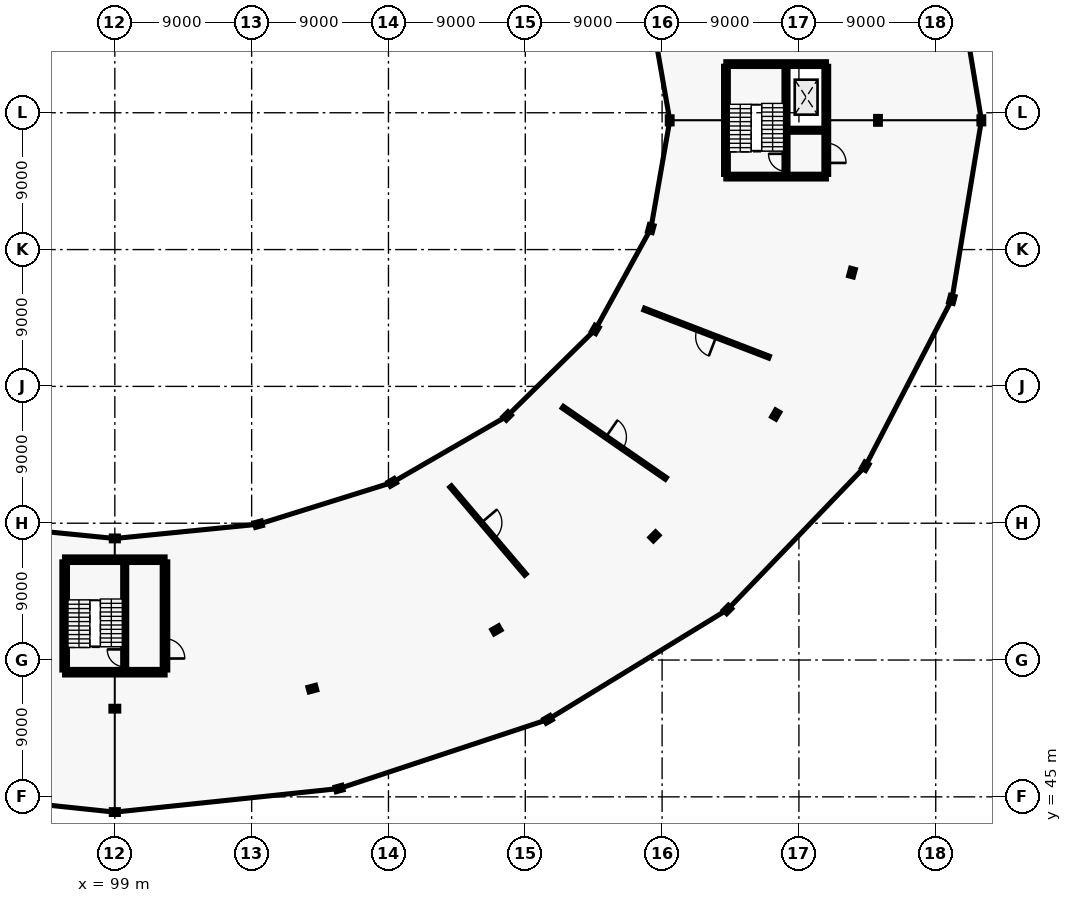
"""IFC4 building model, lengths in metres.
Left out: names, types, materials, properties, quantities, classifications, styles, units other than length and angle.
Written with IfcOpenShell. Run it as: python <this file> out.ifc"""

import sys

from ifc_helpers import new_model, si_unit, direction, frame, frame_2d, origin, origin_2d, place, context, subcontext, project, spatial, rectangle, i_section, extrude, element, fill, save


model = new_model("IFC4")
c1 = context("Model", 3, precision=1e-05, world=origin(), true_north=direction((0.0, 1.0)))
c2 = subcontext(c1, "Body", "Model", "MODEL_VIEW")
j1 = project(units=[si_unit("LENGTHUNIT", "METRE"), si_unit("PLANEANGLEUNIT", "RADIAN")], contexts=[c1])
p1 = place(None, origin())
s1 = spatial("IfcSite", under=j1, at=p1, CompositionType="ELEMENT")
p2 = place(p1, origin())
s2 = spatial("IfcBuilding", under=s1, at=p2, CompositionType="ELEMENT")
p3 = place(p2, frame((0.0, 0.0, 5.4)))
s3 = spatial("IfcBuildingStorey", under=s2, at=p3, CompositionType="ELEMENT", Elevation=5.4)
p4 = place(p3, frame((135.5, 89.5, 0.0), z_axis=(0.0, 0.0, 1.0), x_axis=(1.0, 0.0, 0.0)))
e1 = element("IfcColumn", 1, at=p4, inside=s3, PredefinedType="COLUMN", context=c2, shape_type="SweptSolid", body=[
    extrude(i_section(OverallWidth=0.3, OverallDepth=0.45, WebThickness=0.014, FlangeThickness=0.026, FilletRadius=0.027, at=origin_2d()), origin(), (0.0, 0.0, 1.0), 4.2),
])
p5 = place(p3, frame((149.2, 89.5, 0.0), z_axis=(0.0, 0.0, 1.0), x_axis=(1.0, 0.0, 0.0)))
e2 = element("IfcColumn", 2, at=p5, inside=s3, PredefinedType="COLUMN", context=c2, shape_type="SweptSolid", body=[
    extrude(i_section(OverallWidth=0.3, OverallDepth=0.5, WebThickness=0.014, FlangeThickness=0.028, FilletRadius=0.027, at=origin_2d()), origin(), (0.0, 0.0, 1.0), 4.2),
])
p6 = place(p3, frame((156.0, 89.5, 0.0), z_axis=(0.0, 0.0, 1.0), x_axis=(1.0, 0.0, 0.0)))
e3 = element("IfcColumn", 3, at=p6, inside=s3, PredefinedType="COLUMN", context=c2, shape_type="SweptSolid", body=[
    extrude(i_section(OverallWidth=0.3, OverallDepth=0.45, WebThickness=0.014, FlangeThickness=0.026, FilletRadius=0.027, at=origin_2d()), origin(), (0.0, 0.0, 1.0), 4.18),
])
p7 = place(p3, frame((99.0, 62.0, 0.0), z_axis=(0.0, 0.0, 1.0), x_axis=(0.0, -1.0, 0.0)))
e4 = element("IfcColumn", 4, at=p7, inside=s3, PredefinedType="COLUMN", context=c2, shape_type="SweptSolid", body=[
    extrude(i_section(OverallWidth=0.3, OverallDepth=0.45, WebThickness=0.014, FlangeThickness=0.026, FilletRadius=0.027, at=origin_2d()), origin(), (0.0, 0.0, 1.0), 4.2),
])
p8 = place(p3, frame((99.0, 50.8, 0.0), z_axis=(0.0, 0.0, 1.0), x_axis=(0.0, -1.0, 0.0)))
e5 = element("IfcColumn", 5, at=p8, inside=s3, PredefinedType="COLUMN", context=c2, shape_type="SweptSolid", body=[
    extrude(i_section(OverallWidth=0.3, OverallDepth=0.5, WebThickness=0.014, FlangeThickness=0.028, FilletRadius=0.027, at=origin_2d()), origin(), (0.0, 0.0, 1.0), 4.2),
])
p9 = place(p3, frame((99.0, 44.0, 0.0), z_axis=(0.0, 0.0, 1.0), x_axis=(0.0, -1.0, 0.0)))
e6 = element("IfcColumn", 6, at=p9, inside=s3, PredefinedType="COLUMN", context=c2, shape_type="SweptSolid", body=[
    extrude(i_section(OverallWidth=0.3, OverallDepth=0.45, WebThickness=0.014, FlangeThickness=0.026, FilletRadius=0.027, at=origin_2d()), origin(), (0.0, 0.0, 1.0), 4.18),
])
p10 = place(p3, frame((108.447, 62.937, 0.0), z_axis=(0.0, 0.0, 1.0), x_axis=(0.258819045103, -0.965925826289, 0.0)))
e7 = element("IfcColumn", 7, at=p10, inside=s3, PredefinedType="COLUMN", context=c2, shape_type="SweptSolid", body=[
    extrude(i_section(OverallWidth=0.3, OverallDepth=0.45, WebThickness=0.014, FlangeThickness=0.026, FilletRadius=0.027, at=origin_2d()), origin(), (0.0, 0.0, 1.0), 4.2),
])
p11 = place(p3, frame((111.993, 52.119, 0.0), z_axis=(0.0, 0.0, 1.0), x_axis=(0.258819045103, -0.965925826289, 0.0)))
e8 = element("IfcColumn", 8, at=p11, inside=s3, PredefinedType="COLUMN", context=c2, shape_type="SweptSolid", body=[
    extrude(i_section(OverallWidth=0.3, OverallDepth=0.5, WebThickness=0.014, FlangeThickness=0.028, FilletRadius=0.027, at=origin_2d()), origin(), (0.0, 0.0, 1.0), 4.2),
])
p12 = place(p3, frame((113.753, 45.55, 0.0), z_axis=(0.0, 0.0, 1.0), x_axis=(0.258819045103, -0.965925826289, 0.0)))
e9 = element("IfcColumn", 9, at=p12, inside=s3, PredefinedType="COLUMN", context=c2, shape_type="SweptSolid", body=[
    extrude(i_section(OverallWidth=0.3, OverallDepth=0.45, WebThickness=0.014, FlangeThickness=0.026, FilletRadius=0.027, at=origin_2d()), origin(), (0.0, 0.0, 1.0), 4.18),
])
p13 = place(p3, frame((117.25, 65.684, 0.0), z_axis=(0.0, 0.0, 1.0), x_axis=(0.5, -0.866025403784, 0.0)))
e10 = element("IfcColumn", 10, at=p13, inside=s3, PredefinedType="COLUMN", context=c2, shape_type="SweptSolid", body=[
    extrude(i_section(OverallWidth=0.3, OverallDepth=0.45, WebThickness=0.014, FlangeThickness=0.026, FilletRadius=0.027, at=origin_2d()), origin(), (0.0, 0.0, 1.0), 4.2),
])
p14 = place(p3, frame((124.1, 55.985, 0.0), z_axis=(0.0, 0.0, 1.0), x_axis=(0.5, -0.866025403784, 0.0)))
e11 = element("IfcColumn", 11, at=p14, inside=s3, PredefinedType="COLUMN", context=c2, shape_type="SweptSolid", body=[
    extrude(i_section(OverallWidth=0.3, OverallDepth=0.5, WebThickness=0.014, FlangeThickness=0.028, FilletRadius=0.027, at=origin_2d()), origin(), (0.0, 0.0, 1.0), 4.2),
])
p15 = place(p3, frame((127.5, 50.096, 0.0), z_axis=(0.0, 0.0, 1.0), x_axis=(0.5, -0.866025403784, 0.0)))
e12 = element("IfcColumn", 12, at=p15, inside=s3, PredefinedType="COLUMN", context=c2, shape_type="SweptSolid", body=[
    extrude(i_section(OverallWidth=0.3, OverallDepth=0.45, WebThickness=0.014, FlangeThickness=0.026, FilletRadius=0.027, at=origin_2d()), origin(), (0.0, 0.0, 1.0), 4.18),
])
p16 = place(p3, frame((124.809, 70.055, 0.0), z_axis=(0.0, 0.0, 1.0), x_axis=(0.707106781187, -0.707106781187, 0.0)))
e13 = element("IfcColumn", 13, at=p16, inside=s3, PredefinedType="COLUMN", context=c2, shape_type="SweptSolid", body=[
    extrude(i_section(OverallWidth=0.3, OverallDepth=0.45, WebThickness=0.014, FlangeThickness=0.026, FilletRadius=0.027, at=origin_2d()), origin(), (0.0, 0.0, 1.0), 4.2),
])
p17 = place(p3, frame((134.497, 62.135, 0.0), z_axis=(0.0, 0.0, 1.0), x_axis=(0.707106781187, -0.707106781187, 0.0)))
e14 = element("IfcColumn", 14, at=p17, inside=s3, PredefinedType="COLUMN", context=c2, shape_type="SweptSolid", body=[
    extrude(i_section(OverallWidth=0.3, OverallDepth=0.5, WebThickness=0.014, FlangeThickness=0.028, FilletRadius=0.027, at=origin_2d()), origin(), (0.0, 0.0, 1.0), 4.2),
])
p18 = place(p3, frame((139.305, 57.327, 0.0), z_axis=(0.0, 0.0, 1.0), x_axis=(0.707106781187, -0.707106781187, 0.0)))
e15 = element("IfcColumn", 15, at=p18, inside=s3, PredefinedType="COLUMN", context=c2, shape_type="SweptSolid", body=[
    extrude(i_section(OverallWidth=0.3, OverallDepth=0.45, WebThickness=0.014, FlangeThickness=0.026, FilletRadius=0.027, at=origin_2d()), origin(), (0.0, 0.0, 1.0), 4.18),
])
p19 = place(p3, frame((130.61, 75.75, 0.0), z_axis=(0.0, 0.0, 1.0), x_axis=(0.866025403784, -0.5, 0.0)))
e16 = element("IfcColumn", 16, at=p19, inside=s3, PredefinedType="COLUMN", context=c2, shape_type="SweptSolid", body=[
    extrude(i_section(OverallWidth=0.3, OverallDepth=0.45, WebThickness=0.014, FlangeThickness=0.026, FilletRadius=0.027, at=origin_2d()), origin(), (0.0, 0.0, 1.0), 4.2),
])
p20 = place(p3, frame((142.474, 70.15, 0.0), z_axis=(0.0, 0.0, 1.0), x_axis=(0.866025403784, -0.5, 0.0)))
e17 = element("IfcColumn", 17, at=p20, inside=s3, PredefinedType="COLUMN", context=c2, shape_type="SweptSolid", body=[
    extrude(i_section(OverallWidth=0.3, OverallDepth=0.5, WebThickness=0.014, FlangeThickness=0.028, FilletRadius=0.027, at=origin_2d()), origin(), (0.0, 0.0, 1.0), 4.2),
])
p21 = place(p3, frame((148.363, 66.75, 0.0), z_axis=(0.0, 0.0, 1.0), x_axis=(0.866025403784, -0.5, 0.0)))
e18 = element("IfcColumn", 18, at=p21, inside=s3, PredefinedType="COLUMN", context=c2, shape_type="SweptSolid", body=[
    extrude(i_section(OverallWidth=0.3, OverallDepth=0.45, WebThickness=0.014, FlangeThickness=0.026, FilletRadius=0.027, at=origin_2d()), origin(), (0.0, 0.0, 1.0), 4.18),
])
p22 = place(p3, frame((134.256, 82.382, 0.0), z_axis=(0.0, 0.0, 1.0), x_axis=(0.965925826289, -0.258819045103, 0.0)))
e19 = element("IfcColumn", 19, at=p22, inside=s3, PredefinedType="COLUMN", context=c2, shape_type="SweptSolid", body=[
    extrude(i_section(OverallWidth=0.3, OverallDepth=0.45, WebThickness=0.014, FlangeThickness=0.026, FilletRadius=0.027, at=origin_2d()), origin(), (0.0, 0.0, 1.0), 4.2),
])
p23 = place(p3, frame((147.489, 79.484, 0.0), z_axis=(0.0, 0.0, 1.0), x_axis=(0.965925826289, -0.258819045103, 0.0)))
e20 = element("IfcColumn", 20, at=p23, inside=s3, PredefinedType="COLUMN", context=c2, shape_type="SweptSolid", body=[
    extrude(i_section(OverallWidth=0.3, OverallDepth=0.5, WebThickness=0.014, FlangeThickness=0.028, FilletRadius=0.027, at=origin_2d()), origin(), (0.0, 0.0, 1.0), 4.2),
])
p24 = place(p3, frame((154.058, 77.724, 0.0), z_axis=(0.0, 0.0, 1.0), x_axis=(0.965925826289, -0.258819045103, 0.0)))
e21 = element("IfcColumn", 21, at=p24, inside=s3, PredefinedType="COLUMN", context=c2, shape_type="SweptSolid", body=[
    extrude(i_section(OverallWidth=0.3, OverallDepth=0.45, WebThickness=0.014, FlangeThickness=0.026, FilletRadius=0.027, at=origin_2d()), origin(), (0.0, 0.0, 1.0), 4.18),
])
for number, where, z_axis, x_axis in (
    (22, (139.2, 85.8, 0.0), (0.0, 0.0, 1.0), (1.0, 0.0, 0.0)),
    (23, (139.2, 93.2, 0.0), (0.0, 0.0, 1.0), (1.0, 0.0, 0.0)),
):
    element("IfcWall", number, at=place(p3, frame(where, z_axis=z_axis, x_axis=x_axis)), inside=s3, PredefinedType="SHEAR", context=c2, shape_type="SweptSolid", body=[
        extrude(rectangle(XDim=6.6, YDim=0.3, at=frame_2d((3.3, 0.0))), origin(), (0.0, 0.0, 1.0), 4.2),
    ])
p25 = place(p3, frame((139.2, 85.95, 0.0), z_axis=(0.0, 0.0, 1.0), x_axis=(0.0, 1.0, 0.0)))
e24 = element("IfcWall", 24, at=p25, inside=s3, PredefinedType="SHEAR", context=c2, shape_type="SweptSolid", body=[
    extrude(rectangle(XDim=7.1, YDim=0.3, at=frame_2d((3.55, 0.0))), origin(), (0.0, 0.0, 1.0), 4.2),
])
p26 = place(p3, frame((145.8, 85.95, 0.0), z_axis=(0.0, 0.0, 1.0), x_axis=(0.0, 1.0, 0.0)))
e25 = element("IfcWall", 25, at=p26, inside=s3, PredefinedType="SHEAR", context=c2, shape_type="SweptSolid", body=[
    extrude(rectangle(XDim=7.1, YDim=0.3, at=frame_2d((3.55, 0.0))), origin(), (0.0, 0.0, 1.0), 4.2),
])
p27 = place(p26, frame((0.75, 0.0, 0.0)))
e26 = element("IfcOpeningElement", 26, at=p27, cuts=e25, PredefinedType="OPENING", context=c2, shape_type="SweptSolid", body=[
    extrude(rectangle(XDim=1.3, YDim=2.15, at=frame_2d((0.65, 1.075))), frame((0.0, 0.16, 0.0), z_axis=(0.0, -1.0, 0.0), x_axis=(1.0, 0.0, 0.0)), (0.0, 0.0, 1.0), 0.32),
])
p28 = place(p3, frame((143.15, 85.95, 0.0), z_axis=(0.0, 0.0, 1.0), x_axis=(0.0, 1.0, 0.0)))
e27 = element("IfcWall", 27, at=p28, inside=s3, PredefinedType="SHEAR", context=c2, shape_type="SweptSolid", body=[
    extrude(rectangle(XDim=7.1, YDim=0.25, at=frame_2d((3.55, 0.0))), origin(), (0.0, 0.0, 1.0), 4.2),
])
p29 = place(p28, frame((0.2, 0.0, 0.0)))
e28 = element("IfcOpeningElement", 28, at=p29, cuts=e27, PredefinedType="OPENING", context=c2, shape_type="SweptSolid", body=[
    extrude(rectangle(XDim=1.15, YDim=2.15, at=frame_2d((0.575, 1.075))), frame((0.0, 0.135, 0.0), z_axis=(0.0, -1.0, 0.0), x_axis=(1.0, 0.0, 0.0)), (0.0, 0.0, 1.0), 0.27),
])
p30 = place(p3, frame((143.27, 88.85, 0.0), z_axis=(0.0, 0.0, 1.0), x_axis=(1.0, 0.0, 0.0)))
e29 = element("IfcWall", 29, at=p30, inside=s3, PredefinedType="SHEAR", context=c2, shape_type="SweptSolid", body=[
    extrude(rectangle(XDim=2.38, YDim=0.25, at=frame_2d((1.19, 0.0))), origin(), (0.0, 0.0, 1.0), 4.2),
])
p31 = place(p30, frame((0.64, 0.0, 0.0)))
e30 = element("IfcOpeningElement", 30, at=p31, cuts=e29, PredefinedType="OPENING", context=c2, shape_type="SweptSolid", body=[
    extrude(rectangle(XDim=1.1, YDim=2.15, at=frame_2d((0.55, 1.075))), frame((0.0, 0.135, 0.0), z_axis=(0.0, -1.0, 0.0), x_axis=(1.0, 0.0, 0.0)), (0.0, 0.0, 1.0), 0.27),
])
for number, where, z_axis, x_axis in (
    (31, (95.7, 53.2, 0.0), (0.0, 0.0, 1.0), (1.0, 0.0, 0.0)),
    (32, (95.7, 60.6, 0.0), (0.0, 0.0, 1.0), (1.0, 0.0, 0.0)),
):
    element("IfcWall", number, at=place(p3, frame(where, z_axis=z_axis, x_axis=x_axis)), inside=s3, PredefinedType="SHEAR", context=c2, shape_type="SweptSolid", body=[
        extrude(rectangle(XDim=6.6, YDim=0.35, at=frame_2d((3.3, 0.0))), origin(), (0.0, 0.0, 1.0), 4.2),
    ])
p32 = place(p3, frame((95.7, 53.35, 0.0), z_axis=(0.0, 0.0, 1.0), x_axis=(0.0, 1.0, 0.0)))
e33 = element("IfcWall", 33, at=p32, inside=s3, PredefinedType="SHEAR", context=c2, shape_type="SweptSolid", body=[
    extrude(rectangle(XDim=7.1, YDim=0.35, at=frame_2d((3.55, 0.0))), origin(), (0.0, 0.0, 1.0), 4.2),
])
p33 = place(p3, frame((102.3, 53.35, 0.0), z_axis=(0.0, 0.0, 1.0), x_axis=(0.0, 1.0, 0.0)))
e34 = element("IfcWall", 34, at=p33, inside=s3, PredefinedType="SHEAR", context=c2, shape_type="SweptSolid", body=[
    extrude(rectangle(XDim=7.1, YDim=0.35, at=frame_2d((3.55, 0.0))), origin(), (0.0, 0.0, 1.0), 4.2),
])
p34 = place(p33, frame((0.75, 0.0, 0.0)))
e35 = element("IfcOpeningElement", 35, at=p34, cuts=e34, PredefinedType="OPENING", context=c2, shape_type="SweptSolid", body=[
    extrude(rectangle(XDim=1.3, YDim=2.15, at=frame_2d((0.65, 1.075))), frame((0.0, 0.185, 0.0), z_axis=(0.0, -1.0, 0.0), x_axis=(1.0, 0.0, 0.0)), (0.0, 0.0, 1.0), 0.37),
])
p35 = place(p3, frame((99.65, 53.35, 0.0), z_axis=(0.0, 0.0, 1.0), x_axis=(0.0, 1.0, 0.0)))
e36 = element("IfcWall", 36, at=p35, inside=s3, PredefinedType="SHEAR", context=c2, shape_type="SweptSolid", body=[
    extrude(rectangle(XDim=7.1, YDim=0.25, at=frame_2d((3.55, 0.0))), origin(), (0.0, 0.0, 1.0), 4.2),
])
p36 = place(p35, frame((0.2, 0.0, 0.0)))
e37 = element("IfcOpeningElement", 37, at=p36, cuts=e36, PredefinedType="OPENING", context=c2, shape_type="SweptSolid", body=[
    extrude(rectangle(XDim=1.15, YDim=2.15, at=frame_2d((0.575, 1.075))), frame((0.0, 0.135, 0.0), z_axis=(0.0, -1.0, 0.0), x_axis=(1.0, 0.0, 0.0)), (0.0, 0.0, 1.0), 0.27),
])
p37 = place(p3, frame((121.094, 65.407, 0.0), z_axis=(0.0, 0.0, 1.0), x_axis=(0.647387575623, -0.762160958676, 0.0)))
e38 = element("IfcWall", 38, at=p37, inside=s3, PredefinedType="PARTITIONING", context=c2, shape_type="SweptSolid", body=[
    extrude(rectangle(XDim=7.581, YDim=0.12, at=frame_2d((3.791, 0.0))), origin(), (0.0, 0.0, 1.0), 3.2),
])
p38 = place(p37, frame((3.116, 0.0, 0.0)))
e39 = element("IfcOpeningElement", 39, at=p38, cuts=e38, PredefinedType="OPENING", context=c2, shape_type="SweptSolid", body=[
    extrude(rectangle(XDim=1.35, YDim=2.2, at=frame_2d((0.675, 1.1))), frame((0.0, 0.07, 0.0), z_axis=(0.0, -1.0, 0.0), x_axis=(1.0, 0.0, 0.0)), (0.0, 0.0, 1.0), 0.14),
])
p39 = place(p3, frame((128.475, 70.626, 0.0), z_axis=(0.0, 0.0, 1.0), x_axis=(0.822666462931, -0.568524309743, 0.0)))
e40 = element("IfcWall", 40, at=p39, inside=s3, PredefinedType="PARTITIONING", context=c2, shape_type="SweptSolid", body=[
    extrude(rectangle(XDim=8.223, YDim=0.12, at=frame_2d((4.112, 0.0))), origin(), (0.0, 0.0, 1.0), 3.2),
])
p40 = place(p39, frame((3.437, 0.0, 0.0)))
e41 = element("IfcOpeningElement", 41, at=p40, cuts=e40, PredefinedType="OPENING", context=c2, shape_type="SweptSolid", body=[
    extrude(rectangle(XDim=1.35, YDim=2.2, at=frame_2d((0.675, 1.1))), frame((0.0, 0.07, 0.0), z_axis=(0.0, -1.0, 0.0), x_axis=(1.0, 0.0, 0.0)), (0.0, 0.0, 1.0), 0.14),
])
p41 = place(p3, frame((133.83, 77.082, 0.0), z_axis=(0.0, 0.0, 1.0), x_axis=(0.933238808021, -0.359256631399, 0.0)))
e42 = element("IfcWall", 42, at=p41, inside=s3, PredefinedType="PARTITIONING", context=c2, shape_type="SweptSolid", body=[
    extrude(rectangle(XDim=8.782, YDim=0.12, at=frame_2d((4.391, 0.0))), origin(), (0.0, 0.0, 1.0), 3.2),
])
p42 = place(p41, frame((3.716, 0.0, 0.0)))
e43 = element("IfcOpeningElement", 43, at=p42, cuts=e42, PredefinedType="OPENING", context=c2, shape_type="SweptSolid", body=[
    extrude(rectangle(XDim=1.35, YDim=2.2, at=frame_2d((0.675, 1.1))), frame((0.0, 0.07, 0.0), z_axis=(0.0, -1.0, 0.0), x_axis=(1.0, 0.0, 0.0)), (0.0, 0.0, 1.0), 0.14),
])
p43 = place(p27, frame((1.3, 0.0, 0.0), z_axis=(0.0, 0.0, 1.0), x_axis=(-1.0, 0.0, 0.0)))
e44 = element("IfcDoor", 44, at=p43, inside=s3, OperationType="DOUBLE_DOOR_SINGLE_SWING", PredefinedType="DOOR", context=c2, shape_type="SweptSolid", body=[
    extrude(rectangle(XDim=1.3, YDim=2.15, at=frame_2d((0.65, 1.075))), frame((0.0, 0.025, 0.0), z_axis=(0.0, -1.0, 0.0), x_axis=(1.0, 0.0, 0.0)), (0.0, 0.0, 1.0), 0.05),
])
fill(e26, e44)
p44 = place(p29, frame((1.15, 0.0, 0.0), z_axis=(0.0, 0.0, 1.0), x_axis=(-1.0, 0.0, 0.0)))
e45 = element("IfcDoor", 45, at=p44, inside=s3, OperationType="SINGLE_SWING_RIGHT", PredefinedType="DOOR", context=c2, shape_type="SweptSolid", body=[
    extrude(rectangle(XDim=1.15, YDim=2.15, at=frame_2d((0.575, 1.075))), frame((0.0, 0.025, 0.0), z_axis=(0.0, -1.0, 0.0), x_axis=(1.0, 0.0, 0.0)), (0.0, 0.0, 1.0), 0.05),
])
fill(e28, e45)
p45 = place(p31, origin())
e46 = element("IfcDoor", 46, at=p45, inside=s3, OperationType="SLIDING_TO_LEFT", PredefinedType="DOOR", context=c2, shape_type="SweptSolid", body=[
    extrude(rectangle(XDim=1.1, YDim=2.15, at=frame_2d((0.55, 1.075))), frame((0.0, 0.025, 0.0), z_axis=(0.0, -1.0, 0.0), x_axis=(1.0, 0.0, 0.0)), (0.0, 0.0, 1.0), 0.05),
])
fill(e30, e46)
p46 = place(p34, frame((1.3, 0.0, 0.0), z_axis=(0.0, 0.0, 1.0), x_axis=(-1.0, 0.0, 0.0)))
e47 = element("IfcDoor", 47, at=p46, inside=s3, OperationType="DOUBLE_DOOR_SINGLE_SWING", PredefinedType="DOOR", context=c2, shape_type="SweptSolid", body=[
    extrude(rectangle(XDim=1.3, YDim=2.15, at=frame_2d((0.65, 1.075))), frame((0.0, 0.025, 0.0), z_axis=(0.0, -1.0, 0.0), x_axis=(1.0, 0.0, 0.0)), (0.0, 0.0, 1.0), 0.05),
])
fill(e35, e47)
p47 = place(p36, frame((1.15, 0.0, 0.0), z_axis=(0.0, 0.0, 1.0), x_axis=(-1.0, 0.0, 0.0)))
e48 = element("IfcDoor", 48, at=p47, inside=s3, OperationType="SINGLE_SWING_RIGHT", PredefinedType="DOOR", context=c2, shape_type="SweptSolid", body=[
    extrude(rectangle(XDim=1.15, YDim=2.15, at=frame_2d((0.575, 1.075))), frame((0.0, 0.025, 0.0), z_axis=(0.0, -1.0, 0.0), x_axis=(1.0, 0.0, 0.0)), (0.0, 0.0, 1.0), 0.05),
])
fill(e37, e48)
p48 = place(p38, origin())
e49 = element("IfcDoor", 49, at=p48, inside=s3, OperationType="SINGLE_SWING_LEFT", PredefinedType="DOOR", context=c2, shape_type="SweptSolid", body=[
    extrude(rectangle(XDim=1.35, YDim=2.2, at=frame_2d((0.675, 1.1))), frame((0.0, 0.025, 0.0), z_axis=(0.0, -1.0, 0.0), x_axis=(1.0, 0.0, 0.0)), (0.0, 0.0, 1.0), 0.05),
])
fill(e39, e49)
p49 = place(p40, origin())
e50 = element("IfcDoor", 50, at=p49, inside=s3, OperationType="SINGLE_SWING_LEFT", PredefinedType="DOOR", context=c2, shape_type="SweptSolid", body=[
    extrude(rectangle(XDim=1.35, YDim=2.2, at=frame_2d((0.675, 1.1))), frame((0.0, 0.025, 0.0), z_axis=(0.0, -1.0, 0.0), x_axis=(1.0, 0.0, 0.0)), (0.0, 0.0, 1.0), 0.05),
])
fill(e41, e50)
p50 = place(p42, origin())
e51 = element("IfcDoor", 51, at=p50, inside=s3, OperationType="SINGLE_SWING_RIGHT", PredefinedType="DOOR", context=c2, shape_type="SweptSolid", body=[
    extrude(rectangle(XDim=1.35, YDim=2.2, at=frame_2d((0.675, 1.1))), frame((0.0, 0.025, 0.0), z_axis=(0.0, -1.0, 0.0), x_axis=(1.0, 0.0, 0.0)), (0.0, 0.0, 1.0), 0.05),
])
fill(e43, e51)
save(model, sys.argv[1])
